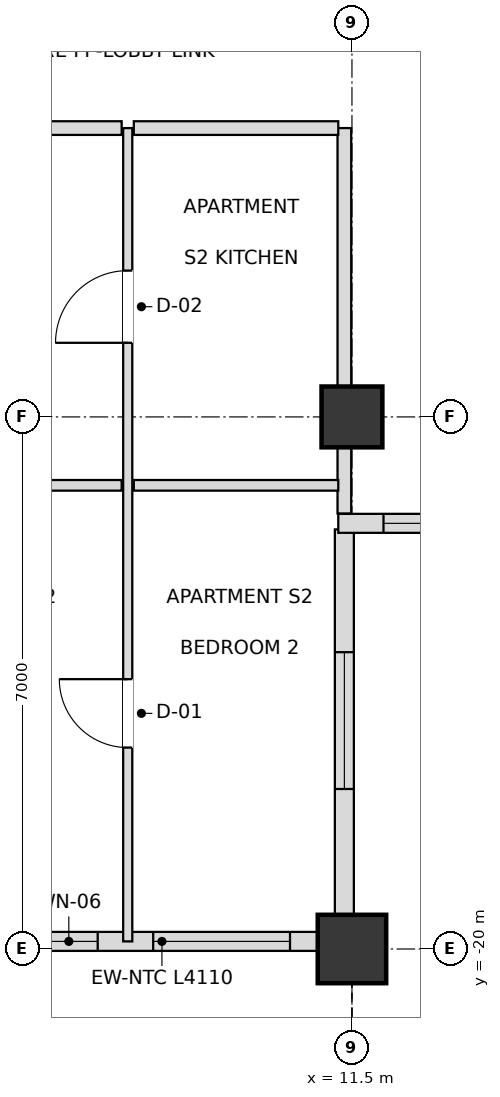
"""IFC4 building model, lengths in metres.
Left out: names, types, materials, properties, quantities, classifications, styles, units other than length and angle.
Written with IfcOpenShell. Run it as: python <this file> out.ifc"""

import sys

from ifc_helpers import new_model, si_unit, direction, frame, frame_2d, origin, origin_2d, place, context, subcontext, project, spatial, rectangle, extrude, element, fill, save


model = new_model("IFC4")
c1 = context("Model", 3, precision=1e-05, world=origin(), true_north=direction((0.0, 1.0)))
c2 = subcontext(c1, "Body", "Model", "MODEL_VIEW")
j1 = project(units=[si_unit("LENGTHUNIT", "METRE"), si_unit("PLANEANGLEUNIT", "RADIAN")], contexts=[c1])
p1 = place(None, origin())
s1 = spatial("IfcSite", under=j1, at=p1, CompositionType="ELEMENT")
p2 = place(p1, origin())
s2 = spatial("IfcBuilding", under=s1, at=p2, CompositionType="ELEMENT")
p3 = place(p2, frame((0.0, 0.0, 229.5)))
s3 = spatial("IfcBuildingStorey", under=s2, at=p3, CompositionType="ELEMENT", Elevation=229.5)
p4 = place(p3, frame((11.5, -20.0, 0.0), z_axis=(0.0, 0.0, 1.0), x_axis=(1.0, 0.0, 0.0)))
e1 = element("IfcColumn", 1, at=p4, inside=s3, PredefinedType="USERDEFINED", context=c2, shape_type="SweptSolid", body=[
    extrude(rectangle(XDim=0.9, YDim=0.9, at=origin_2d()), origin(), (0.0, 0.0, 1.0), 3.6),
])
p5 = place(p3, frame((11.5, -13.0, 0.0), z_axis=(0.0, 0.0, 1.0), x_axis=(1.0, 0.0, 0.0)))
e2 = element("IfcColumn", 2, at=p5, inside=s3, PredefinedType="COLUMN", context=c2, shape_type="SweptSolid", body=[
    extrude(rectangle(XDim=0.8, YDim=0.8, at=origin_2d()), origin(), (0.0, 0.0, 1.0), 3.6),
])
p6 = place(p3, frame((6.945, -19.9, 0.0), z_axis=(0.0, 0.0, 1.0), x_axis=(1.0, 0.0, 0.0)))
e3 = element("IfcWall", 3, at=p6, inside=s3, PredefinedType="SOLIDWALL", context=c2, shape_type="SweptSolid", body=[
    extrude(rectangle(XDim=4.11, YDim=0.25, at=frame_2d((2.055, 0.0))), origin(), (0.0, 0.0, 1.0), 2.748),
])
p7 = place(p6, frame((0.45, 0.0, 0.72)))
e4 = element("IfcOpeningElement", 4, at=p7, cuts=e3, PredefinedType="OPENING", context=c2, shape_type="SweptSolid", body=[
    extrude(rectangle(XDim=0.76, YDim=1.68, at=frame_2d((0.38, 0.84))), frame((0.0, 0.135, 0.0), z_axis=(0.0, -1.0, 0.0), x_axis=(1.0, 0.0, 0.0)), (0.0, 0.0, 1.0), 0.27),
])
p8 = place(p6, frame((1.94, 0.0, 0.72)))
e5 = element("IfcOpeningElement", 5, at=p8, cuts=e3, PredefinedType="OPENING", context=c2, shape_type="SweptSolid", body=[
    extrude(rectangle(XDim=1.8, YDim=1.68, at=frame_2d((0.9, 0.84))), frame((0.0, 0.135, 0.0), z_axis=(0.0, -1.0, 0.0), x_axis=(1.0, 0.0, 0.0)), (0.0, 0.0, 1.0), 0.27),
])
p9 = place(p3, frame((11.4, -19.82, 0.0), z_axis=(0.0, 0.0, 1.0), x_axis=(0.0, 1.0, 0.0)))
e6 = element("IfcWall", 6, at=p9, inside=s3, PredefinedType="SOLIDWALL", context=c2, shape_type="SweptSolid", body=[
    extrude(rectangle(XDim=5.34, YDim=0.25, at=frame_2d((2.67, 0.0))), origin(), (0.0, 0.0, 1.0), 2.748),
])
p10 = place(p9, frame((1.925, 0.0, 0.72)))
e7 = element("IfcOpeningElement", 7, at=p10, cuts=e6, PredefinedType="OPENING", context=c2, shape_type="SweptSolid", body=[
    extrude(rectangle(XDim=1.8, YDim=1.68, at=frame_2d((0.9, 0.84))), frame((0.0, 0.135, 0.0), z_axis=(0.0, -1.0, 0.0), x_axis=(1.0, 0.0, 0.0)), (0.0, 0.0, 1.0), 0.27),
])
p11 = place(p3, frame((11.32, -14.4, 0.0), z_axis=(0.0, 0.0, 1.0), x_axis=(1.0, 0.0, 0.0)))
e8 = element("IfcWall", 8, at=p11, inside=s3, PredefinedType="SOLIDWALL", context=c2, shape_type="SweptSolid", body=[
    extrude(rectangle(XDim=5.66, YDim=0.25, at=frame_2d((2.83, 0.0))), origin(), (0.0, 0.0, 1.0), 2.748),
])
p12 = place(p11, frame((0.595, 0.0, 0.72)))
e9 = element("IfcOpeningElement", 9, at=p12, cuts=e8, PredefinedType="OPENING", context=c2, shape_type="SweptSolid", body=[
    extrude(rectangle(XDim=1.8, YDim=1.68, at=frame_2d((0.9, 0.84))), frame((0.0, 0.135, 0.0), z_axis=(0.0, -1.0, 0.0), x_axis=(1.0, 0.0, 0.0)), (0.0, 0.0, 1.0), 0.27),
])
p13 = place(p11, frame((3.265, 0.0, 0.72)))
e10 = element("IfcOpeningElement", 10, at=p13, cuts=e8, PredefinedType="OPENING", context=c2, shape_type="SweptSolid", body=[
    extrude(rectangle(XDim=1.8, YDim=1.68, at=frame_2d((0.9, 0.84))), frame((0.0, 0.135, 0.0), z_axis=(0.0, -1.0, 0.0), x_axis=(1.0, 0.0, 0.0)), (0.0, 0.0, 1.0), 0.27),
])
p14 = place(p3, frame((8.55, -19.9, 0.0), z_axis=(0.0, 0.0, 1.0), x_axis=(0.0, 1.0, 0.0)))
e11 = element("IfcWall", 11, at=p14, inside=s3, PredefinedType="PARTITIONING", context=c2, shape_type="SweptSolid", body=[
    extrude(rectangle(XDim=10.7, YDim=0.12, at=frame_2d((5.35, 0.0))), origin(), (0.0, 0.0, 1.0), 2.826),
])
p15 = place(p14, frame((7.875, 0.0, 0.0)))
e12 = element("IfcOpeningElement", 12, at=p15, cuts=e11, PredefinedType="OPENING", context=c2, shape_type="SweptSolid", body=[
    extrude(rectangle(XDim=0.95, YDim=2.1, at=frame_2d((0.475, 1.05))), frame((0.0, 0.07, 0.0), z_axis=(0.0, -1.0, 0.0), x_axis=(1.0, 0.0, 0.0)), (0.0, 0.0, 1.0), 0.14),
])
p16 = place(p14, frame((2.55, 0.0, 0.0)))
e13 = element("IfcOpeningElement", 13, at=p16, cuts=e11, PredefinedType="OPENING", context=c2, shape_type="SweptSolid", body=[
    extrude(rectangle(XDim=0.9, YDim=2.1, at=frame_2d((0.45, 1.05))), frame((0.0, 0.07, 0.0), z_axis=(0.0, -1.0, 0.0), x_axis=(1.0, 0.0, 0.0)), (0.0, 0.0, 1.0), 0.14),
])
p17 = place(p3, frame((11.4, -14.27, 0.0), z_axis=(0.0, 0.0, 1.0), x_axis=(0.0, 1.0, 0.0)))
e14 = element("IfcWall", 14, at=p17, inside=s3, PredefinedType="PARTITIONING", context=c2, shape_type="SweptSolid", body=[
    extrude(rectangle(XDim=5.07, YDim=0.18, at=frame_2d((2.535, 0.0))), origin(), (0.0, 0.0, 1.0), 2.748),
])
p18 = place(p3, frame((4.93, -13.9, 0.0), z_axis=(0.0, 0.0, 1.0), x_axis=(1.0, 0.0, 0.0)))
e15 = element("IfcWall", 15, at=p18, inside=s3, PredefinedType="PARTITIONING", context=c2, shape_type="SweptSolid", body=[
    extrude(rectangle(XDim=3.54, YDim=0.14, at=frame_2d((1.77, 0.0))), origin(), (0.0, 0.0, 1.0), 2.826),
])
p19 = place(p3, frame((8.63, -13.9, 0.0), z_axis=(0.0, 0.0, 1.0), x_axis=(1.0, 0.0, 0.0)))
e16 = element("IfcWall", 16, at=p19, inside=s3, PredefinedType="PARTITIONING", context=c2, shape_type="SweptSolid", body=[
    extrude(rectangle(XDim=2.69, YDim=0.14, at=frame_2d((1.345, 0.0))), origin(), (0.0, 0.0, 1.0), 3.38),
])
p20 = place(p3, frame((2.48, -9.2, 0.0), z_axis=(0.0, 0.0, 1.0), x_axis=(1.0, 0.0, 0.0)))
e17 = element("IfcWall", 17, at=p20, inside=s3, PredefinedType="PARTITIONING", context=c2, shape_type="SweptSolid", body=[
    extrude(rectangle(XDim=5.99, YDim=0.18, at=frame_2d((2.995, 0.0))), origin(), (0.0, 0.0, 1.0), 2.826),
])
p21 = place(p20, frame((2.535, 0.0, 0.0)))
e18 = element("IfcOpeningElement", 18, at=p21, cuts=e17, PredefinedType="OPENING", context=c2, shape_type="SweptSolid", body=[
    extrude(rectangle(XDim=0.95, YDim=2.15, at=frame_2d((0.475, 1.075))), frame((0.0, 0.1, 0.0), z_axis=(0.0, -1.0, 0.0), x_axis=(1.0, 0.0, 0.0)), (0.0, 0.0, 1.0), 0.2),
])
p22 = place(p3, frame((8.63, -9.2, 0.0), z_axis=(0.0, 0.0, 1.0), x_axis=(1.0, 0.0, 0.0)))
e19 = element("IfcWall", 19, at=p22, inside=s3, PredefinedType="PARTITIONING", context=c2, shape_type="SweptSolid", body=[
    extrude(rectangle(XDim=2.69, YDim=0.18, at=frame_2d((1.345, 0.0))), origin(), (0.0, 0.0, 1.0), 3.38),
])
p23 = place(p7, origin())
e20 = element("IfcWindow", 20, at=p23, inside=s3, PartitioningType="SINGLE_PANEL", PredefinedType="WINDOW", context=c2, shape_type="SweptSolid", body=[
    extrude(rectangle(XDim=0.76, YDim=1.68, at=frame_2d((0.38, 0.84))), frame((0.0, 0.03, 0.0), z_axis=(0.0, -1.0, 0.0), x_axis=(1.0, 0.0, 0.0)), (0.0, 0.0, 1.0), 0.06),
])
fill(e4, e20)
p24 = place(p8, origin())
e21 = element("IfcWindow", 21, at=p24, inside=s3, PartitioningType="SINGLE_PANEL", PredefinedType="WINDOW", context=c2, shape_type="SweptSolid", body=[
    extrude(rectangle(XDim=1.8, YDim=1.68, at=frame_2d((0.9, 0.84))), frame((0.0, 0.03, 0.0), z_axis=(0.0, -1.0, 0.0), x_axis=(1.0, 0.0, 0.0)), (0.0, 0.0, 1.0), 0.06),
])
fill(e5, e21)
p25 = place(p10, origin())
e22 = element("IfcWindow", 22, at=p25, inside=s3, PartitioningType="SINGLE_PANEL", PredefinedType="WINDOW", context=c2, shape_type="SweptSolid", body=[
    extrude(rectangle(XDim=1.8, YDim=1.68, at=frame_2d((0.9, 0.84))), frame((0.0, 0.03, 0.0), z_axis=(0.0, -1.0, 0.0), x_axis=(1.0, 0.0, 0.0)), (0.0, 0.0, 1.0), 0.06),
])
fill(e7, e22)
p26 = place(p12, origin())
e23 = element("IfcWindow", 23, at=p26, inside=s3, PartitioningType="SINGLE_PANEL", PredefinedType="WINDOW", context=c2, shape_type="SweptSolid", body=[
    extrude(rectangle(XDim=1.8, YDim=1.68, at=frame_2d((0.9, 0.84))), frame((0.0, 0.03, 0.0), z_axis=(0.0, -1.0, 0.0), x_axis=(1.0, 0.0, 0.0)), (0.0, 0.0, 1.0), 0.06),
])
fill(e9, e23)
p27 = place(p15, origin())
e24 = element("IfcDoor", 24, at=p27, inside=s3, OperationType="SINGLE_SWING_LEFT", PredefinedType="DOOR", context=c2, shape_type="SweptSolid", body=[
    extrude(rectangle(XDim=0.95, YDim=2.1, at=frame_2d((0.475, 1.05))), frame((0.0, 0.025, 0.0), z_axis=(0.0, -1.0, 0.0), x_axis=(1.0, 0.0, 0.0)), (0.0, 0.0, 1.0), 0.05),
])
fill(e12, e24)
p28 = place(p16, origin())
e25 = element("IfcDoor", 25, at=p28, inside=s3, OperationType="SINGLE_SWING_RIGHT", PredefinedType="DOOR", context=c2, shape_type="SweptSolid", body=[
    extrude(rectangle(XDim=0.9, YDim=2.1, at=frame_2d((0.45, 1.05))), frame((0.0, 0.025, 0.0), z_axis=(0.0, -1.0, 0.0), x_axis=(1.0, 0.0, 0.0)), (0.0, 0.0, 1.0), 0.05),
])
fill(e13, e25)
save(model, sys.argv[1])
